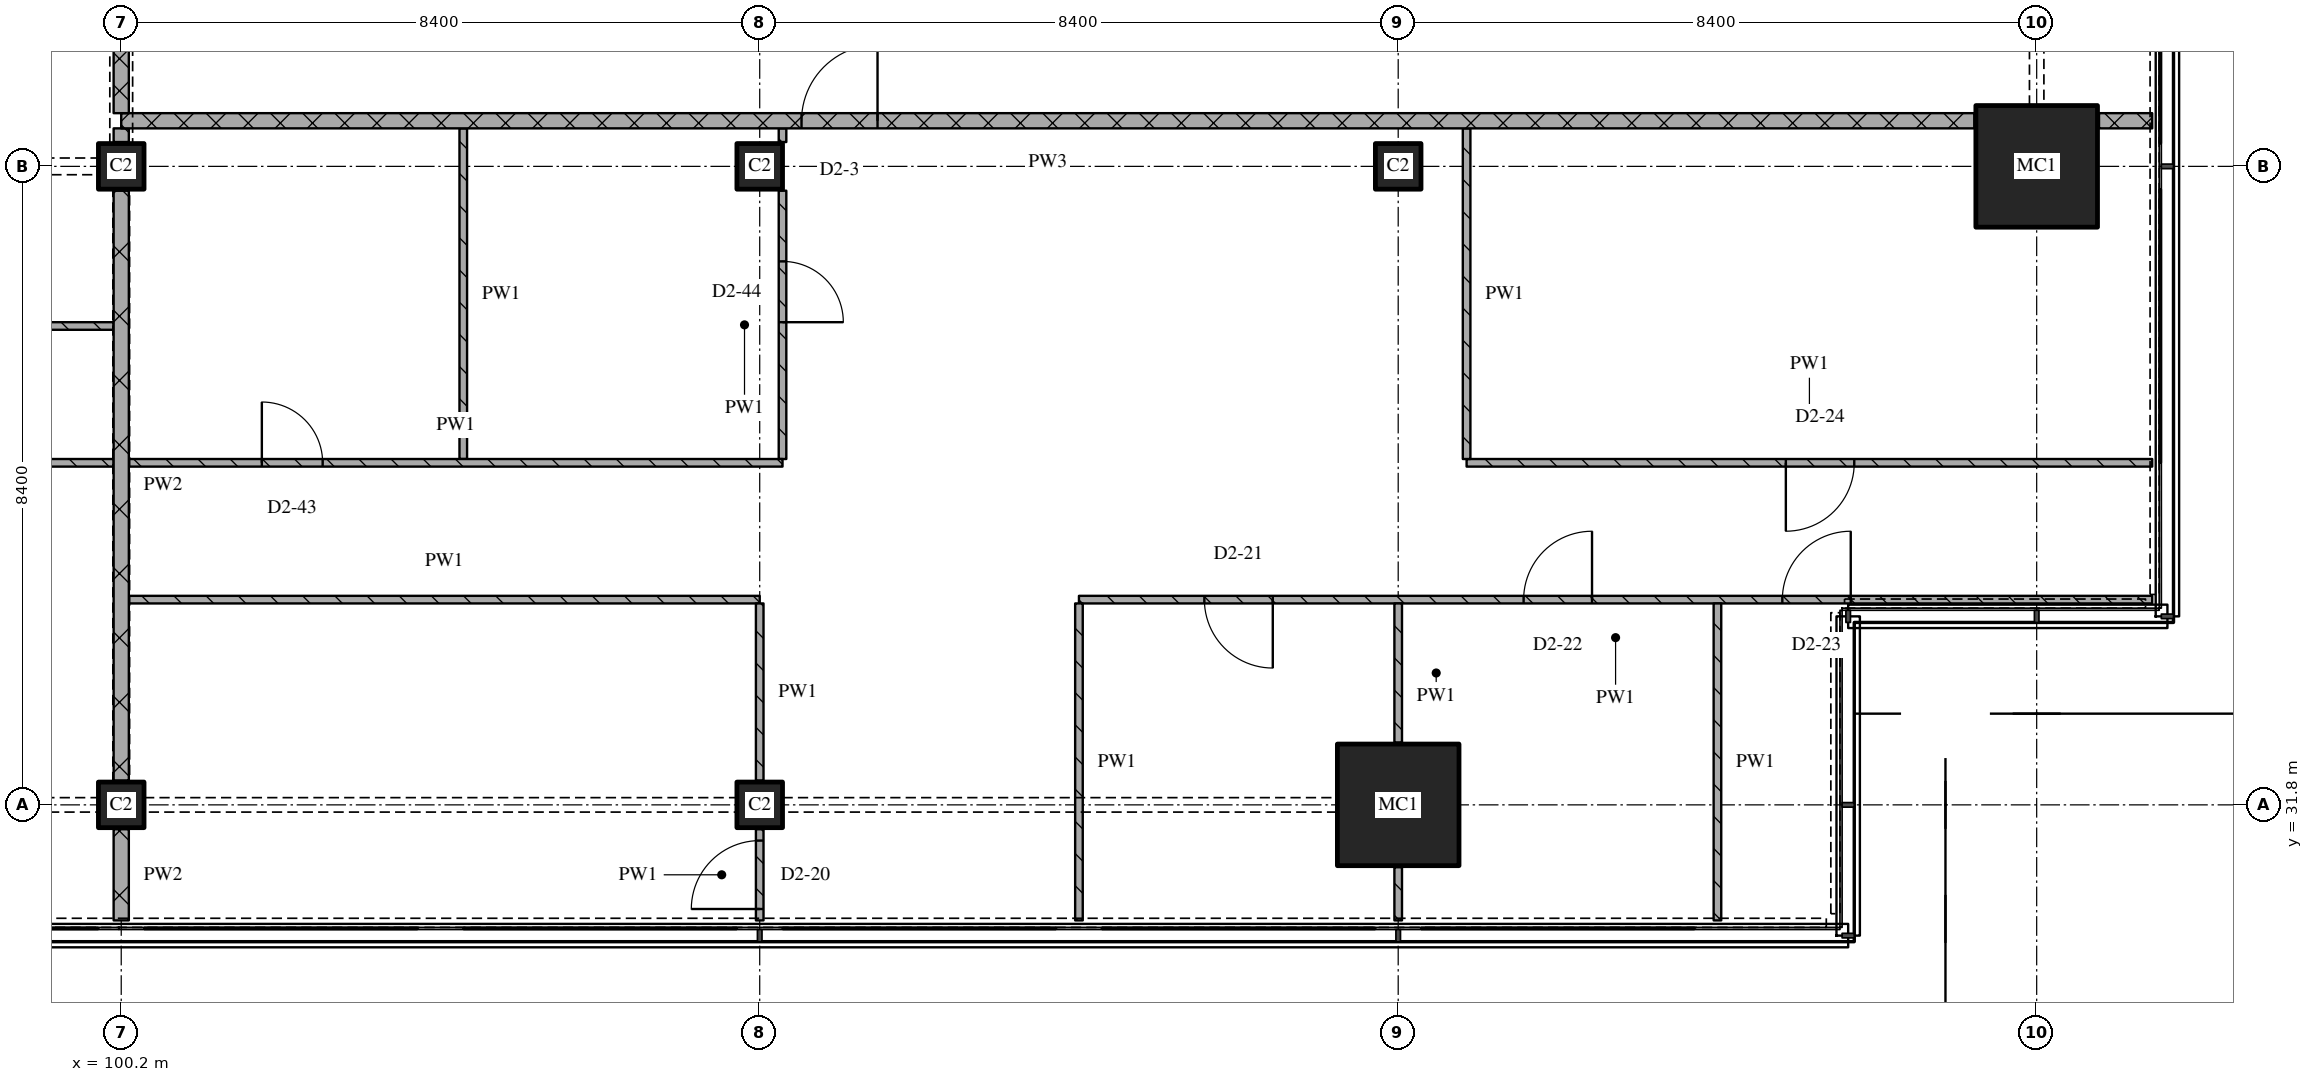
"""IFC4 building model, lengths in metres.
Left out: names, types, materials, properties, quantities, classifications, styles, units other than length and angle.
Written with IfcOpenShell. Run it as: python <this file> out.ifc"""

import sys

from ifc_helpers import new_model, si_unit, direction, frame, frame_2d, origin, origin_2d, place, context, subcontext, project, spatial, rectangle, extrude, element, fill, save


model = new_model("IFC4")
c1 = context("Model", 3, precision=1e-05, world=origin(), true_north=direction((0.0, 1.0)))
c2 = subcontext(c1, "Body", "Model", "MODEL_VIEW")
j1 = project(units=[si_unit("LENGTHUNIT", "METRE"), si_unit("PLANEANGLEUNIT", "RADIAN")], contexts=[c1])
p1 = place(None, origin())
s1 = spatial("IfcSite", under=j1, at=p1, CompositionType="ELEMENT")
p2 = place(p1, origin())
s2 = spatial("IfcBuilding", under=s1, at=p2, CompositionType="ELEMENT")
p3 = place(p2, frame((0.0, 0.0, 216.3)))
s3 = spatial("IfcBuildingStorey", under=s2, at=p3, CompositionType="ELEMENT", Elevation=216.3)
for number, where, z_axis, x_axis in (
    (1, (100.2, 31.8, 0.0), (0.0, 0.0, 1.0), (1.0, 0.0, 0.0)),
    (2, (100.2, 40.2, 0.0), (0.0, 0.0, 1.0), (1.0, 0.0, 0.0)),
    (3, (108.6, 31.8, 0.0), (0.0, 0.0, 1.0), (1.0, 0.0, 0.0)),
    (4, (108.6, 40.2, 0.0), (0.0, 0.0, 1.0), (1.0, 0.0, 0.0)),
):
    element("IfcColumn", number, at=place(p3, frame(where, z_axis=z_axis, x_axis=x_axis)), inside=s3, PredefinedType="COLUMN", context=c2, shape_type="SweptSolid", body=[
        extrude(rectangle(XDim=0.6, YDim=0.6, at=origin_2d()), origin(), (0.0, 0.0, 1.0), 3.6),
    ])
p4 = place(p3, frame((117.0, 31.8, 0.0), z_axis=(0.0, 0.0, 1.0), x_axis=(1.0, 0.0, 0.0)))
e5 = element("IfcColumn", 5, at=p4, inside=s3, PredefinedType="COLUMN", context=c2, shape_type="SweptSolid", body=[
    extrude(rectangle(XDim=1.6, YDim=1.6, at=origin_2d()), origin(), (0.0, 0.0, 1.0), 3.6),
])
p5 = place(p3, frame((117.0, 40.2, 0.0), z_axis=(0.0, 0.0, 1.0), x_axis=(1.0, 0.0, 0.0)))
e6 = element("IfcColumn", 6, at=p5, inside=s3, PredefinedType="COLUMN", context=c2, shape_type="SweptSolid", body=[
    extrude(rectangle(XDim=0.6, YDim=0.6, at=origin_2d()), origin(), (0.0, 0.0, 1.0), 3.6),
])
p6 = place(p3, frame((125.4, 40.2, 0.0), z_axis=(0.0, 0.0, 1.0), x_axis=(1.0, 0.0, 0.0)))
e7 = element("IfcColumn", 7, at=p6, inside=s3, PredefinedType="COLUMN", context=c2, shape_type="SweptSolid", body=[
    extrude(rectangle(XDim=1.6, YDim=1.6, at=origin_2d()), origin(), (0.0, 0.0, 1.0), 3.6),
])
p7 = place(p3, frame((100.3, 34.5, 0.0), z_axis=(0.0, 0.0, 1.0), x_axis=(1.0, 0.0, 0.0)))
e8 = element("IfcWall", 8, at=p7, inside=s3, PredefinedType="PARTITIONING", context=c2, shape_type="SweptSolid", body=[
    extrude(rectangle(XDim=8.3, YDim=0.1, at=frame_2d((4.15, 0.0))), origin(), (0.0, 0.0, 1.0), 3.32),
])
p8 = place(p3, frame((126.92, 34.5, 0.0), z_axis=(0.0, 0.0, 1.0), x_axis=(-1.0, 0.0, 0.0)))
e9 = element("IfcWall", 9, at=p8, inside=s3, PredefinedType="PARTITIONING", context=c2, shape_type="SweptSolid", body=[
    extrude(rectangle(XDim=14.12, YDim=0.1, at=frame_2d((7.06, 0.0))), origin(), (0.0, 0.0, 1.0), 3.32),
])
p9 = place(p8, frame((3.966, 0.0, 0.0)))
e10 = element("IfcOpeningElement", 10, at=p9, cuts=e9, PredefinedType="OPENING", context=c2, shape_type="SweptSolid", body=[
    extrude(rectangle(XDim=0.9, YDim=2.1, at=frame_2d((0.45, 1.05))), frame((0.0, 0.06, 0.0), z_axis=(0.0, -1.0, 0.0), x_axis=(1.0, 0.0, 0.0)), (0.0, 0.0, 1.0), 0.12),
])
p10 = place(p8, frame((7.37, 0.0, 0.0)))
e11 = element("IfcOpeningElement", 11, at=p10, cuts=e9, PredefinedType="OPENING", context=c2, shape_type="SweptSolid", body=[
    extrude(rectangle(XDim=0.9, YDim=2.1, at=frame_2d((0.45, 1.05))), frame((0.0, 0.06, 0.0), z_axis=(0.0, -1.0, 0.0), x_axis=(1.0, 0.0, 0.0)), (0.0, 0.0, 1.0), 0.12),
])
p11 = place(p8, frame((11.57, 0.0, 0.0)))
e12 = element("IfcOpeningElement", 12, at=p11, cuts=e9, PredefinedType="OPENING", context=c2, shape_type="SweptSolid", body=[
    extrude(rectangle(XDim=0.9, YDim=2.1, at=frame_2d((0.45, 1.05))), frame((0.0, 0.06, 0.0), z_axis=(0.0, -1.0, 0.0), x_axis=(1.0, 0.0, 0.0)), (0.0, 0.0, 1.0), 0.12),
])
p12 = place(p3, frame((117.9, 36.3, 0.0), z_axis=(0.0, 0.0, 1.0), x_axis=(1.0, 0.0, 0.0)))
e13 = element("IfcWall", 13, at=p12, inside=s3, PredefinedType="PARTITIONING", context=c2, shape_type="SweptSolid", body=[
    extrude(rectangle(XDim=9.02, YDim=0.1, at=frame_2d((4.51, 0.0))), origin(), (0.0, 0.0, 1.0), 3.32),
])
p13 = place(p12, frame((4.2, 0.0, 0.0)))
e14 = element("IfcOpeningElement", 14, at=p13, cuts=e13, PredefinedType="OPENING", context=c2, shape_type="SweptSolid", body=[
    extrude(rectangle(XDim=0.9, YDim=2.1, at=frame_2d((0.45, 1.05))), frame((0.0, 0.06, 0.0), z_axis=(0.0, -1.0, 0.0), x_axis=(1.0, 0.0, 0.0)), (0.0, 0.0, 1.0), 0.12),
])
p14 = place(p3, frame((95.4, 38.1, 0.0), z_axis=(0.0, 0.0, 1.0), x_axis=(1.0, 0.0, 0.0)))
e15 = element("IfcWall", 15, at=p14, inside=s3, PredefinedType="PARTITIONING", context=c2, shape_type="SweptSolid", body=[
    extrude(rectangle(XDim=4.7, YDim=0.1, at=frame_2d((2.35, 0.0))), origin(), (0.0, 0.0, 1.0), 3.32),
])
p15 = place(p14, frame((1.95, 0.0, 0.0)))
e16 = element("IfcOpeningElement", 16, at=p15, cuts=e15, PredefinedType="OPENING", context=c2, shape_type="SweptSolid", body=[
    extrude(rectangle(XDim=0.9, YDim=2.1, at=frame_2d((0.45, 1.05))), frame((0.0, 0.06, 0.0), z_axis=(0.0, -1.0, 0.0), x_axis=(1.0, 0.0, 0.0)), (0.0, 0.0, 1.0), 0.12),
])
p16 = place(p3, frame((124.58, 40.8, 0.0), z_axis=(0.0, 0.0, 1.0), x_axis=(-1.0, 0.0, 0.0)))
e17 = element("IfcWall", 17, at=p16, inside=s3, PredefinedType="PARTITIONING", context=c2, shape_type="SweptSolid", body=[
    extrude(rectangle(XDim=24.38, YDim=0.2, at=frame_2d((12.19, 0.0))), origin(), (0.0, 0.0, 1.0), 3.32),
])
p17 = place(p16, frame((14.43, 0.0, 0.0)))
e18 = element("IfcOpeningElement", 18, at=p17, cuts=e17, PredefinedType="OPENING", context=c2, shape_type="SweptSolid", body=[
    extrude(rectangle(XDim=1.0, YDim=2.1, at=frame_2d((0.5, 1.05))), frame((0.0, 0.11, 0.0), z_axis=(0.0, -1.0, 0.0), x_axis=(1.0, 0.0, 0.0)), (0.0, 0.0, 1.0), 0.22),
])
p18 = place(p3, frame((126.22, 40.8, 0.0), z_axis=(0.0, 0.0, 1.0), x_axis=(1.0, 0.0, 0.0)))
e19 = element("IfcWall", 19, at=p18, inside=s3, PredefinedType="PARTITIONING", context=c2, shape_type="SweptSolid", body=[
    extrude(rectangle(XDim=0.7, YDim=0.2, at=frame_2d((0.35, 0.0))), origin(), (0.0, 0.0, 1.0), 3.32),
])
p19 = place(p3, frame((100.2, 43.1, 0.0), z_axis=(0.0, 0.0, 1.0), x_axis=(0.0, -1.0, 0.0)))
e20 = element("IfcWall", 20, at=p19, inside=s3, PredefinedType="PARTITIONING", context=c2, shape_type="SweptSolid", body=[
    extrude(rectangle(XDim=2.2, YDim=0.2, at=frame_2d((1.1, 0.0))), origin(), (0.0, 0.0, 1.0), 2.53),
])
p20 = place(p3, frame((100.2, 31.48, 0.0), z_axis=(0.0, 0.0, 1.0), x_axis=(0.0, -1.0, 0.0)))
e21 = element("IfcWall", 21, at=p20, inside=s3, PredefinedType="PARTITIONING", context=c2, shape_type="SweptSolid", body=[
    extrude(rectangle(XDim=1.2, YDim=0.2, at=frame_2d((0.6, 0.0))), origin(), (0.0, 0.0, 1.0), 3.32),
])
p21 = place(p3, frame((100.2, 39.88, 0.0), z_axis=(0.0, 0.0, 1.0), x_axis=(0.0, -1.0, 0.0)))
e22 = element("IfcWall", 22, at=p21, inside=s3, PredefinedType="PARTITIONING", context=c2, shape_type="SweptSolid", body=[
    extrude(rectangle(XDim=7.76, YDim=0.2, at=frame_2d((3.88, 0.0))), origin(), (0.0, 0.0, 1.0), 2.72),
])
p22 = place(p3, frame((100.2, 40.7, 0.0), z_axis=(0.0, 0.0, 1.0), x_axis=(0.0, -1.0, 0.0)))
e23 = element("IfcWall", 23, at=p22, inside=s3, PredefinedType="PARTITIONING", context=c2, shape_type="SweptSolid", body=[
    extrude(rectangle(XDim=0.18, YDim=0.2, at=frame_2d((0.09, 0.0))), origin(), (0.0, 0.0, 1.0), 3.32),
])
p23 = place(p3, frame((104.7, 40.7, 0.0), z_axis=(0.0, 0.0, 1.0), x_axis=(0.0, -1.0, 0.0)))
e24 = element("IfcWall", 24, at=p23, inside=s3, PredefinedType="PARTITIONING", context=c2, shape_type="SweptSolid", body=[
    extrude(rectangle(XDim=4.35, YDim=0.1, at=frame_2d((2.175, 0.0))), origin(), (0.0, 0.0, 1.0), 3.32),
])
p24 = place(p3, frame((108.6, 30.28, 0.0), z_axis=(0.0, 0.0, 1.0), x_axis=(0.0, 1.0, 0.0)))
e25 = element("IfcWall", 25, at=p24, inside=s3, PredefinedType="PARTITIONING", context=c2, shape_type="SweptSolid", body=[
    extrude(rectangle(XDim=1.2, YDim=0.1, at=frame_2d((0.6, 0.0))), origin(), (0.0, 0.0, 1.0), 3.32),
])
p25 = place(p24, frame((0.15, 0.0, 0.0)))
e26 = element("IfcOpeningElement", 26, at=p25, cuts=e25, PredefinedType="OPENING", context=c2, shape_type="SweptSolid", body=[
    extrude(rectangle(XDim=0.9, YDim=2.1, at=frame_2d((0.45, 1.05))), frame((0.0, 0.06, 0.0), z_axis=(0.0, -1.0, 0.0), x_axis=(1.0, 0.0, 0.0)), (0.0, 0.0, 1.0), 0.12),
])
p26 = place(p3, frame((108.6, 34.45, 0.0), z_axis=(0.0, 0.0, 1.0), x_axis=(0.0, -1.0, 0.0)))
e27 = element("IfcWall", 27, at=p26, inside=s3, PredefinedType="PARTITIONING", context=c2, shape_type="SweptSolid", body=[
    extrude(rectangle(XDim=2.33, YDim=0.1, at=frame_2d((1.165, 0.0))), origin(), (0.0, 0.0, 1.0), 3.32),
])
p27 = place(p3, frame((108.9, 36.35, 0.0), z_axis=(0.0, 0.0, 1.0), x_axis=(0.0, 1.0, 0.0)))
e28 = element("IfcWall", 28, at=p27, inside=s3, PredefinedType="PARTITIONING", context=c2, shape_type="SweptSolid", body=[
    extrude(rectangle(XDim=3.53, YDim=0.1, at=frame_2d((1.765, 0.0))), origin(), (0.0, 0.0, 1.0), 3.32),
])
p28 = place(p27, frame((1.8, 0.0, 0.0)))
e29 = element("IfcOpeningElement", 29, at=p28, cuts=e28, PredefinedType="OPENING", context=c2, shape_type="SweptSolid", body=[
    extrude(rectangle(XDim=0.8, YDim=2.1, at=frame_2d((0.4, 1.05))), frame((0.0, 0.06, 0.0), z_axis=(0.0, -1.0, 0.0), x_axis=(1.0, 0.0, 0.0)), (0.0, 0.0, 1.0), 0.12),
])
p29 = place(p3, frame((108.9, 40.7, 0.0), z_axis=(0.0, 0.0, 1.0), x_axis=(0.0, -1.0, 0.0)))
e30 = element("IfcWall", 30, at=p29, inside=s3, PredefinedType="PARTITIONING", context=c2, shape_type="SweptSolid", body=[
    extrude(rectangle(XDim=0.18, YDim=0.1, at=frame_2d((0.09, 0.0))), origin(), (0.0, 0.0, 1.0), 3.32),
])
p30 = place(p3, frame((112.8, 34.45, 0.0), z_axis=(0.0, 0.0, 1.0), x_axis=(0.0, -1.0, 0.0)))
e31 = element("IfcWall", 31, at=p30, inside=s3, PredefinedType="PARTITIONING", context=c2, shape_type="SweptSolid", body=[
    extrude(rectangle(XDim=4.17, YDim=0.1, at=frame_2d((2.085, 0.0))), origin(), (0.0, 0.0, 1.0), 3.32),
])
p31 = place(p3, frame((117.0, 30.98, 0.0), z_axis=(0.0, 0.0, 1.0), x_axis=(0.0, -1.0, 0.0)))
e32 = element("IfcWall", 32, at=p31, inside=s3, PredefinedType="PARTITIONING", context=c2, shape_type="SweptSolid", body=[
    extrude(rectangle(XDim=0.7, YDim=0.1, at=frame_2d((0.35, 0.0))), origin(), (0.0, 0.0, 1.0), 3.32),
])
p32 = place(p3, frame((117.0, 34.45, 0.0), z_axis=(0.0, 0.0, 1.0), x_axis=(0.0, -1.0, 0.0)))
e33 = element("IfcWall", 33, at=p32, inside=s3, PredefinedType="PARTITIONING", context=c2, shape_type="SweptSolid", body=[
    extrude(rectangle(XDim=1.83, YDim=0.1, at=frame_2d((0.915, 0.0))), origin(), (0.0, 0.0, 1.0), 3.32),
])
p33 = place(p3, frame((117.9, 40.7, 0.0), z_axis=(0.0, 0.0, 1.0), x_axis=(0.0, -1.0, 0.0)))
e34 = element("IfcWall", 34, at=p33, inside=s3, PredefinedType="PARTITIONING", context=c2, shape_type="SweptSolid", body=[
    extrude(rectangle(XDim=4.35, YDim=0.1, at=frame_2d((2.175, 0.0))), origin(), (0.0, 0.0, 1.0), 3.32),
])
p34 = place(p3, frame((121.2, 34.45, 0.0), z_axis=(0.0, 0.0, 1.0), x_axis=(0.0, -1.0, 0.0)))
e35 = element("IfcWall", 35, at=p34, inside=s3, PredefinedType="PARTITIONING", context=c2, shape_type="SweptSolid", body=[
    extrude(rectangle(XDim=4.17, YDim=0.1, at=frame_2d((2.085, 0.0))), origin(), (0.0, 0.0, 1.0), 3.32),
])
p35 = place(p3, frame((100.1, 36.3, 0.0), z_axis=(0.0, 0.0, 1.0), x_axis=(-1.0, 0.0, 0.0)))
e36 = element("IfcWall", 36, at=p35, inside=s3, PredefinedType="PARTITIONING", context=c2, shape_type="SweptSolid", body=[
    extrude(rectangle(XDim=20.9, YDim=0.1, at=frame_2d((10.45, 0.0))), origin(), (0.0, 0.0, 1.0), 3.32),
])
p36 = place(p35, frame((1.55, 0.0, 0.0)))
e37 = element("IfcOpeningElement", 37, at=p36, cuts=e36, PredefinedType="OPENING", context=c2, shape_type="SweptSolid", body=[
    extrude(rectangle(XDim=0.9, YDim=2.1, at=frame_2d((0.45, 1.05))), frame((0.0, 0.06, 0.0), z_axis=(0.0, -1.0, 0.0), x_axis=(1.0, 0.0, 0.0)), (0.0, 0.0, 1.0), 0.12),
])
p37 = place(p35, frame((7.85, 0.0, 0.0)))
e38 = element("IfcOpeningElement", 38, at=p37, cuts=e36, PredefinedType="OPENING", context=c2, shape_type="SweptSolid", body=[
    extrude(rectangle(XDim=0.9, YDim=2.1, at=frame_2d((0.45, 1.05))), frame((0.0, 0.06, 0.0), z_axis=(0.0, -1.0, 0.0), x_axis=(1.0, 0.0, 0.0)), (0.0, 0.0, 1.0), 0.12),
])
p38 = place(p35, frame((16.25, 0.0, 0.0)))
e39 = element("IfcOpeningElement", 39, at=p38, cuts=e36, PredefinedType="OPENING", context=c2, shape_type="SweptSolid", body=[
    extrude(rectangle(XDim=0.9, YDim=2.1, at=frame_2d((0.45, 1.05))), frame((0.0, 0.06, 0.0), z_axis=(0.0, -1.0, 0.0), x_axis=(1.0, 0.0, 0.0)), (0.0, 0.0, 1.0), 0.12),
])
p39 = place(p3, frame((100.3, 36.3, 0.0), z_axis=(0.0, 0.0, 1.0), x_axis=(1.0, 0.0, 0.0)))
e40 = element("IfcWall", 40, at=p39, inside=s3, PredefinedType="PARTITIONING", context=c2, shape_type="SweptSolid", body=[
    extrude(rectangle(XDim=8.6, YDim=0.1, at=frame_2d((4.3, 0.0))), origin(), (0.0, 0.0, 1.0), 3.32),
])
p40 = place(p39, frame((1.75, 0.0, 0.0)))
e41 = element("IfcOpeningElement", 41, at=p40, cuts=e40, PredefinedType="OPENING", context=c2, shape_type="SweptSolid", body=[
    extrude(rectangle(XDim=0.8, YDim=2.1, at=frame_2d((0.4, 1.05))), frame((0.0, 0.06, 0.0), z_axis=(0.0, -1.0, 0.0), x_axis=(1.0, 0.0, 0.0)), (0.0, 0.0, 1.0), 0.12),
])
p41 = place(p9, origin())
e42 = element("IfcDoor", 42, at=p41, inside=s3, OperationType="SINGLE_SWING_RIGHT", PredefinedType="DOOR", context=c2, shape_type="SweptSolid", body=[
    extrude(rectangle(XDim=0.9, YDim=2.1, at=frame_2d((0.45, 1.05))), frame((0.0, 0.025, 0.0), z_axis=(0.0, -1.0, 0.0), x_axis=(1.0, 0.0, 0.0)), (0.0, 0.0, 1.0), 0.05),
])
fill(e10, e42)
p42 = place(p10, origin())
e43 = element("IfcDoor", 43, at=p42, inside=s3, OperationType="SINGLE_SWING_RIGHT", PredefinedType="DOOR", context=c2, shape_type="SweptSolid", body=[
    extrude(rectangle(XDim=0.9, YDim=2.1, at=frame_2d((0.45, 1.05))), frame((0.0, 0.025, 0.0), z_axis=(0.0, -1.0, 0.0), x_axis=(1.0, 0.0, 0.0)), (0.0, 0.0, 1.0), 0.05),
])
fill(e11, e43)
p43 = place(p11, origin())
e44 = element("IfcDoor", 44, at=p43, inside=s3, OperationType="SINGLE_SWING_LEFT", PredefinedType="DOOR", context=c2, shape_type="SweptSolid", body=[
    extrude(rectangle(XDim=0.9, YDim=2.1, at=frame_2d((0.45, 1.05))), frame((0.0, 0.025, 0.0), z_axis=(0.0, -1.0, 0.0), x_axis=(1.0, 0.0, 0.0)), (0.0, 0.0, 1.0), 0.05),
])
fill(e12, e44)
p44 = place(p13, origin())
e45 = element("IfcDoor", 45, at=p44, inside=s3, OperationType="SINGLE_SWING_RIGHT", PredefinedType="DOOR", context=c2, shape_type="SweptSolid", body=[
    extrude(rectangle(XDim=0.9, YDim=2.1, at=frame_2d((0.45, 1.05))), frame((0.0, 0.025, 0.0), z_axis=(0.0, -1.0, 0.0), x_axis=(1.0, 0.0, 0.0)), (0.0, 0.0, 1.0), 0.05),
])
fill(e14, e45)
p45 = place(p17, origin())
e46 = element("IfcDoor", 46, at=p45, inside=s3, OperationType="SINGLE_SWING_RIGHT", PredefinedType="DOOR", context=c2, shape_type="SweptSolid", body=[
    extrude(rectangle(XDim=1.0, YDim=2.1, at=frame_2d((0.5, 1.05))), frame((0.0, 0.025, 0.0), z_axis=(0.0, -1.0, 0.0), x_axis=(1.0, 0.0, 0.0)), (0.0, 0.0, 1.0), 0.05),
])
fill(e18, e46)
p46 = place(p25, origin())
e47 = element("IfcDoor", 47, at=p46, inside=s3, OperationType="SINGLE_SWING_LEFT", PredefinedType="DOOR", context=c2, shape_type="SweptSolid", body=[
    extrude(rectangle(XDim=0.9, YDim=2.1, at=frame_2d((0.45, 1.05))), frame((0.0, 0.025, 0.0), z_axis=(0.0, -1.0, 0.0), x_axis=(1.0, 0.0, 0.0)), (0.0, 0.0, 1.0), 0.05),
])
fill(e26, e47)
p47 = place(p28, origin())
e48 = element("IfcDoor", 48, at=p47, inside=s3, OperationType="SINGLE_SWING_RIGHT", PredefinedType="DOOR", context=c2, shape_type="SweptSolid", body=[
    extrude(rectangle(XDim=0.8, YDim=2.1, at=frame_2d((0.4, 1.05))), frame((0.0, 0.025, 0.0), z_axis=(0.0, -1.0, 0.0), x_axis=(1.0, 0.0, 0.0)), (0.0, 0.0, 1.0), 0.05),
])
fill(e29, e48)
p48 = place(p40, origin())
e49 = element("IfcDoor", 49, at=p48, inside=s3, OperationType="SINGLE_SWING_LEFT", PredefinedType="DOOR", context=c2, shape_type="SweptSolid", body=[
    extrude(rectangle(XDim=0.8, YDim=2.1, at=frame_2d((0.4, 1.05))), frame((0.0, 0.025, 0.0), z_axis=(0.0, -1.0, 0.0), x_axis=(1.0, 0.0, 0.0)), (0.0, 0.0, 1.0), 0.05),
])
fill(e41, e49)
save(model, sys.argv[1])
